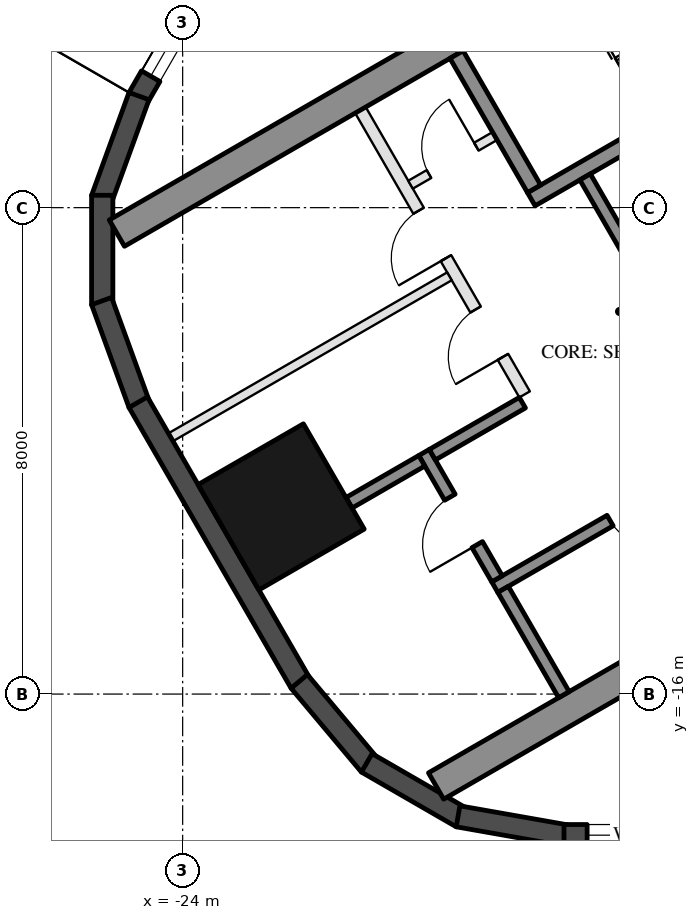
"""IFC4 building model, lengths in metres.
Left out: names, types, materials, properties, quantities, classifications, styles, units other than length and angle.
Written with IfcOpenShell. Run it as: python <this file> out.ifc"""

import sys

from ifc_helpers import new_model, si_unit, direction, frame, frame_2d, origin, origin_2d, place, context, subcontext, project, spatial, rectangle, hollow_rectangle, extrude, boolean, halfspace, element, fill, save


model = new_model("IFC4")
c1 = context("Model", 3, precision=1e-05, world=origin(), true_north=direction((0.0, 1.0)))
c2 = subcontext(c1, "Body", "Model", "MODEL_VIEW")
j1 = project(units=[si_unit("LENGTHUNIT", "METRE"), si_unit("PLANEANGLEUNIT", "RADIAN")], contexts=[c1])
p1 = place(None, origin())
s1 = spatial("IfcSite", under=j1, at=p1, CompositionType="ELEMENT")
p2 = place(p1, origin())
s2 = spatial("IfcBuilding", under=s1, at=p2, CompositionType="ELEMENT")
p3 = place(p2, frame((0.0, 0.0, 272.6)))
s3 = spatial("IfcBuildingStorey", under=s2, at=p3, CompositionType="ELEMENT", Elevation=272.6)
p4 = place(p3, frame((-22.38, -12.921, 0.0), z_axis=(0.0, 0.0, 1.0), x_axis=(-0.5, 0.866025403784, 0.0)))
e1 = element("IfcColumn", 1, at=p4, inside=s3, PredefinedType="COLUMN", context=c2, shape_type="SweptSolid", body=[
    boolean("DIFFERENCE", extrude(hollow_rectangle(XDim=2.0, YDim=2.0, WallThickness=0.05, at=origin_2d()), origin(), (0.0, 0.0, 1.0), 3.7), halfspace(frame((0.0, 0.0, 3.587), z_axis=(0.0, 0.0, 1.0), x_axis=(1.0, 0.0, 0.0)), False)),
])
p5 = place(p3, frame((-22.86, -2.953, 0.0), z_axis=(0.0, 0.0, 1.0), x_axis=(-0.50001992892, -0.866013897511, 0.0)))
e2 = element("IfcWall", 2, at=p5, inside=s3, PredefinedType="SOLIDWALL", context=c2, shape_type="SweptSolid", body=[
    extrude(rectangle(XDim=3.741, YDim=0.35, at=frame_2d((1.871, 0.0))), origin(), (0.0, 0.0, 1.0), 3.55),
])
p6 = place(p5, frame((2.531, 0.0, 0.3)))
e3 = element("IfcOpeningElement", 3, at=p6, cuts=e2, PredefinedType="OPENING", context=c2, shape_type="SweptSolid", body=[
    extrude(rectangle(XDim=0.8, YDim=2.65, at=frame_2d((0.4, 1.325))), frame((0.0, 0.185, 0.0), z_axis=(0.0, -1.0, 0.0), x_axis=(1.0, 0.0, 0.0)), (0.0, 0.0, 1.0), 0.37),
])
p7 = place(p3, frame((-24.718, -6.165, 0.0), z_axis=(0.0, 0.0, 1.0), x_axis=(-0.34206975284, -0.939674562916, 0.0)))
e4 = element("IfcWall", 4, at=p7, inside=s3, PredefinedType="SOLIDWALL", context=c2, shape_type="SweptSolid", body=[
    extrude(rectangle(XDim=1.8, YDim=0.35, at=frame_2d((0.9, 0.0))), origin(), (0.0, 0.0, 1.0), 3.55),
])
p8 = place(p3, frame((-25.323, -7.797, 0.0), z_axis=(0.0, 0.0, 1.0), x_axis=(0.0, -1.0, 0.0)))
e5 = element("IfcWall", 5, at=p8, inside=s3, PredefinedType="SOLIDWALL", context=c2, shape_type="SweptSolid", body=[
    extrude(rectangle(XDim=1.8, YDim=0.35, at=frame_2d((0.9, 0.0))), origin(), (0.0, 0.0, 1.0), 3.55),
])
p9 = place(p3, frame((-25.333, -9.537, 0.0), z_axis=(0.0, 0.0, 1.0), x_axis=(0.34206975284, -0.939674562916, 0.0)))
e6 = element("IfcWall", 6, at=p9, inside=s3, PredefinedType="SOLIDWALL", context=c2, shape_type="SweptSolid", body=[
    extrude(rectangle(XDim=1.8, YDim=0.35, at=frame_2d((0.9, 0.0))), origin(), (0.0, 0.0, 1.0), 3.55),
])
p10 = place(p3, frame((-24.731, -11.2, 0.0), z_axis=(0.0, 0.0, 1.0), x_axis=(0.500025039717, -0.866010946615, 0.0)))
e7 = element("IfcWall", 7, at=p10, inside=s3, PredefinedType="SOLIDWALL", context=c2, shape_type="SweptSolid", body=[
    extrude(rectangle(XDim=5.331, YDim=0.35, at=frame_2d((2.666, 0.0))), origin(), (0.0, 0.0, 1.0), 3.55),
])
p11 = place(p3, frame((-22.083, -15.792, 0.0), z_axis=(0.0, 0.0, 1.0), x_axis=(0.642756114672, -0.766070869471, 0.0)))
e8 = element("IfcWall", 8, at=p11, inside=s3, PredefinedType="SOLIDWALL", context=c2, shape_type="SweptSolid", body=[
    extrude(rectangle(XDim=1.8, YDim=0.35, at=frame_2d((0.9, 0.0))), origin(), (0.0, 0.0, 1.0), 3.55),
])
p12 = place(p3, frame((-20.972, -17.132, 0.0), z_axis=(0.0, 0.0, 1.0), x_axis=(0.866047807691, -0.499961193289, 0.0)))
e9 = element("IfcWall", 9, at=p12, inside=s3, PredefinedType="SOLIDWALL", context=c2, shape_type="SweptSolid", body=[
    extrude(rectangle(XDim=1.8, YDim=0.35, at=frame_2d((0.9, 0.0))), origin(), (0.0, 0.0, 1.0), 3.55),
])
p13 = place(p3, frame((-19.471, -18.011, 0.0), z_axis=(0.0, 0.0, 1.0), x_axis=(0.984810858511, -0.173630564586, 0.0)))
e10 = element("IfcWall", 10, at=p13, inside=s3, PredefinedType="SOLIDWALL", context=c2, shape_type="SweptSolid", body=[
    extrude(rectangle(XDim=1.8, YDim=0.35, at=frame_2d((0.9, 0.0))), origin(), (0.0, 0.0, 1.0), 3.55),
])
p14 = place(p3, frame((-17.729, -18.321, 0.0), z_axis=(0.0, 0.0, 1.0), x_axis=(1.0, 0.0, 0.0)))
e11 = element("IfcWall", 11, at=p14, inside=s3, PredefinedType="SOLIDWALL", context=c2, shape_type="SweptSolid", body=[
    extrude(rectangle(XDim=11.185, YDim=0.35, at=frame_2d((5.593, 0.0))), origin(), (0.0, 0.0, 1.0), 3.55),
])
p15 = place(p14, frame((0.381, 0.0, 0.3)))
e12 = element("IfcOpeningElement", 12, at=p15, cuts=e11, PredefinedType="OPENING", context=c2, shape_type="SweptSolid", body=[
    extrude(rectangle(XDim=1.7, YDim=2.65, at=frame_2d((0.85, 1.325))), frame((0.0, 0.185, 0.0), z_axis=(0.0, -1.0, 0.0), x_axis=(1.0, 0.0, 0.0)), (0.0, 0.0, 1.0), 0.37),
])
p16 = place(p14, frame((7.21, 0.0, 0.0)))
e13 = element("IfcOpeningElement", 13, at=p16, cuts=e11, PredefinedType="OPENING", context=c2, shape_type="SweptSolid", body=[
    extrude(rectangle(XDim=2.4, YDim=2.4, at=frame_2d((1.2, 1.2))), frame((0.0, 0.185, 0.0), z_axis=(0.0, -1.0, 0.0), x_axis=(1.0, 0.0, 0.0)), (0.0, 0.0, 1.0), 0.37),
])
p17 = place(p14, frame((3.516, 0.0, 0.3)))
e14 = element("IfcOpeningElement", 14, at=p17, cuts=e11, PredefinedType="OPENING", context=c2, shape_type="SweptSolid", body=[
    extrude(rectangle(XDim=1.5, YDim=2.65, at=frame_2d((0.75, 1.325))), frame((0.0, 0.185, 0.0), z_axis=(0.0, -1.0, 0.0), x_axis=(1.0, 0.0, 0.0)), (0.0, 0.0, 1.0), 0.37),
])
p18 = place(p14, frame((5.316, 0.0, 0.3)))
e15 = element("IfcOpeningElement", 15, at=p18, cuts=e11, PredefinedType="OPENING", context=c2, shape_type="SweptSolid", body=[
    extrude(rectangle(XDim=1.5, YDim=2.65, at=frame_2d((0.75, 1.325))), frame((0.0, 0.185, 0.0), z_axis=(0.0, -1.0, 0.0), x_axis=(1.0, 0.0, 0.0)), (0.0, 0.0, 1.0), 0.37),
])
for number, where, z_axis, x_axis in (
    (16, (-13.797, -1.903, 0.0), (0.0, 0.0, 1.0), (-0.866, -0.5, 0.0)),
    (17, (-8.547, -10.997, 0.0), (0.0, 0.0, 1.0), (-0.866, -0.5, 0.0)),
):
    element("IfcWall", number, at=place(p3, frame(where, z_axis=z_axis, x_axis=x_axis)), inside=s3, PredefinedType="SHEAR", context=c2, shape_type="SweptSolid", body=[
        extrude(rectangle(XDim=13.031, YDim=0.5, at=frame_2d((6.516, 0.0))), origin(), (0.0, 0.0, 1.0), 3.5),
    ])
p19 = place(p3, frame((-12.681, -4.636, 0.0), z_axis=(0.0, 0.0, 1.0), x_axis=(-0.866021702275, -0.500006411147, 0.0)))
e18 = element("IfcWall", 18, at=p19, inside=s3, PredefinedType="SHEAR", context=c2, shape_type="SweptSolid", body=[
    extrude(rectangle(XDim=6.45, YDim=0.25, at=frame_2d((3.225, 0.0))), origin(), (0.0, 0.0, 1.0), 3.5),
])
p20 = place(p19, frame((0.3, 0.0, 0.0)))
e19 = element("IfcOpeningElement", 19, at=p20, cuts=e18, PredefinedType="OPENING", context=c2, shape_type="SweptSolid", body=[
    extrude(rectangle(XDim=1.0, YDim=2.1, at=frame_2d((0.5, 1.05))), frame((0.0, 0.135, 0.0), z_axis=(0.0, -1.0, 0.0), x_axis=(1.0, 0.0, 0.0)), (0.0, 0.0, 1.0), 0.27),
])
p21 = place(p3, frame((-19.496, -5.482, 0.0), z_axis=(0.0, 0.0, 1.0), x_axis=(0.499990435942, -0.866030925526, 0.0)))
e20 = element("IfcWall", 20, at=p21, inside=s3, PredefinedType="SHEAR", context=c2, shape_type="SweptSolid", body=[
    extrude(rectangle(XDim=2.55, YDim=0.25, at=frame_2d((1.275, 0.0))), origin(), (0.0, 0.0, 1.0), 3.5),
])
p22 = place(p3, frame((-17.381, -7.495, 0.0), z_axis=(0.0, 0.0, 1.0), x_axis=(0.500011755427, -0.866018616679, 0.0)))
e21 = element("IfcWall", 21, at=p22, inside=s3, PredefinedType="SHEAR", context=c2, shape_type="SweptSolid", body=[
    extrude(rectangle(XDim=2.8, YDim=0.2, at=frame_2d((1.4, 0.0))), origin(), (0.0, 0.0, 1.0), 3.5),
])
p23 = place(p3, frame((-10.068, -9.162, 0.0), z_axis=(0.0, 0.0, 1.0), x_axis=(-0.866032725843, -0.499987317609, 0.0)))
e22 = element("IfcWall", 22, at=p23, inside=s3, PredefinedType="SHEAR", context=c2, shape_type="SweptSolid", body=[
    extrude(rectangle(XDim=10.16, YDim=0.2, at=frame_2d((5.08, 0.0))), origin(), (0.0, 0.0, 1.0), 3.5),
])
p24 = place(p23, frame((1.99, 0.0, 0.0)))
e23 = element("IfcOpeningElement", 23, at=p24, cuts=e22, PredefinedType="OPENING", context=c2, shape_type="SweptSolid", body=[
    extrude(rectangle(XDim=0.9, YDim=2.1, at=frame_2d((0.45, 1.05))), frame((0.0, 0.11, 0.0), z_axis=(0.0, -1.0, 0.0), x_axis=(1.0, 0.0, 0.0)), (0.0, 0.0, 1.0), 0.22),
])
p25 = place(p23, frame((7.07, 0.0, 0.0)))
e24 = element("IfcOpeningElement", 24, at=p25, cuts=e22, PredefinedType="OPENING", context=c2, shape_type="SweptSolid", body=[
    extrude(rectangle(XDim=0.9, YDim=2.1, at=frame_2d((0.45, 1.05))), frame((0.0, 0.11, 0.0), z_axis=(0.0, -1.0, 0.0), x_axis=(1.0, 0.0, 0.0)), (0.0, 0.0, 1.0), 0.22),
])
p26 = place(p3, frame((-20.031, -12.026, 0.0), z_axis=(0.0, 0.0, 1.0), x_axis=(0.500033551112, -0.866006032174, 0.0)))
e25 = element("IfcWall", 25, at=p26, inside=s3, PredefinedType="SHEAR", context=c2, shape_type="SweptSolid", body=[
    extrude(rectangle(XDim=2.4, YDim=0.2, at=frame_2d((1.2, 0.0))), origin(), (0.0, 0.0, 1.0), 3.5),
])
p27 = place(p26, frame((0.85, 0.0, 0.0)))
e26 = element("IfcOpeningElement", 26, at=p27, cuts=e25, PredefinedType="OPENING", context=c2, shape_type="SweptSolid", body=[
    extrude(rectangle(XDim=0.9, YDim=2.1, at=frame_2d((0.45, 1.05))), frame((0.0, 0.11, 0.0), z_axis=(0.0, -1.0, 0.0), x_axis=(1.0, 0.0, 0.0)), (0.0, 0.0, 1.0), 0.22),
])
p28 = place(p3, frame((-18.413, -11.208, 0.0), z_axis=(0.0, 0.0, 1.0), x_axis=(-0.866038183914, -0.499977863513, 0.0)))
e27 = element("IfcWall", 27, at=p28, inside=s3, PredefinedType="SHEAR", context=c2, shape_type="SweptSolid", body=[
    extrude(rectangle(XDim=1.71, YDim=0.2, at=frame_2d((0.855, 0.0))), origin(), (0.0, 0.0, 1.0), 3.5),
])
p29 = place(p3, frame((-18.73, -14.278, 0.0), z_axis=(0.0, 0.0, 1.0), x_axis=(0.50002537861, -0.866010750942, 0.0)))
e28 = element("IfcWall", 28, at=p29, inside=s3, PredefinedType="SHEAR", context=c2, shape_type="SweptSolid", body=[
    extrude(rectangle(XDim=2.0, YDim=0.2, at=frame_2d((1.0, 0.0))), origin(), (0.0, 0.0, 1.0), 3.5),
])
p30 = place(p3, frame((-20.067, -12.163, 0.0), z_axis=(0.0, 0.0, 1.0), x_axis=(-0.866094443108, -0.499880401313, 0.0)))
e29 = element("IfcWall", 29, at=p30, inside=s3, PredefinedType="SHEAR", context=c2, shape_type="SweptSolid", body=[
    extrude(rectangle(XDim=1.383, YDim=0.2, at=frame_2d((0.691, 0.0))), origin(), (0.0, 0.0, 1.0), 3.5),
])
p31 = place(p3, frame((-21.076, -6.395, 0.0), z_axis=(0.0, 0.0, 1.0), x_axis=(0.50001468107, -0.866016927499, 0.0)))
e30 = element("IfcWall", 30, at=p31, inside=s3, PredefinedType="PARTITIONING", context=c2, shape_type="SweptSolid", body=[
    extrude(rectangle(XDim=5.4, YDim=0.2, at=frame_2d((2.7, 0.0))), origin(), (0.0, 0.0, 1.0), 3.5),
])
p32 = place(p31, frame((1.913, 0.0, 0.0)))
e31 = element("IfcOpeningElement", 31, at=p32, cuts=e30, PredefinedType="OPENING", context=c2, shape_type="SweptSolid", body=[
    extrude(rectangle(XDim=0.9, YDim=2.1, at=frame_2d((0.45, 1.05))), frame((0.0, 0.11, 0.0), z_axis=(0.0, -1.0, 0.0), x_axis=(1.0, 0.0, 0.0)), (0.0, 0.0, 1.0), 0.22),
])
p33 = place(p31, frame((3.788, 0.0, 0.0)))
e32 = element("IfcOpeningElement", 32, at=p33, cuts=e30, PredefinedType="OPENING", context=c2, shape_type="SweptSolid", body=[
    extrude(rectangle(XDim=0.9, YDim=2.1, at=frame_2d((0.45, 1.05))), frame((0.0, 0.11, 0.0), z_axis=(0.0, -1.0, 0.0), x_axis=(1.0, 0.0, 0.0)), (0.0, 0.0, 1.0), 0.22),
])
p34 = place(p3, frame((-18.866, -6.822, 0.0), z_axis=(0.0, 0.0, 1.0), x_axis=(-0.866028054938, -0.499995408039, 0.0)))
e33 = element("IfcWall", 33, at=p34, inside=s3, PredefinedType="PARTITIONING", context=c2, shape_type="SweptSolid", body=[
    extrude(rectangle(XDim=1.6, YDim=0.15, at=frame_2d((0.8, 0.0))), origin(), (0.0, 0.0, 1.0), 3.5),
])
p35 = place(p34, frame((0.35, 0.0, 0.0)))
e34 = element("IfcOpeningElement", 34, at=p35, cuts=e33, PredefinedType="OPENING", context=c2, shape_type="SweptSolid", body=[
    extrude(rectangle(XDim=0.9, YDim=2.1, at=frame_2d((0.45, 1.05))), frame((0.0, 0.085, 0.0), z_axis=(0.0, -1.0, 0.0), x_axis=(1.0, 0.0, 0.0)), (0.0, 0.0, 1.0), 0.17),
])
p36 = place(p3, frame((-19.613, -9.13, 0.0), z_axis=(0.0, 0.0, 1.0), x_axis=(-0.866028878405, -0.499993981732, 0.0)))
e35 = element("IfcWall", 35, at=p36, inside=s3, PredefinedType="PARTITIONING", context=c2, shape_type="SweptSolid", body=[
    extrude(rectangle(XDim=5.292, YDim=0.15, at=frame_2d((2.646, 0.0))), origin(), (0.0, 0.0, 1.0), 3.5),
])
p37 = place(p15, origin())
e36 = element("IfcWindow", 36, at=p37, inside=s3, PartitioningType="SINGLE_PANEL", PredefinedType="WINDOW", context=c2, shape_type="SweptSolid", body=[
    extrude(rectangle(XDim=1.7, YDim=2.65, at=frame_2d((0.85, 1.325))), frame((0.0, 0.03, 0.0), z_axis=(0.0, -1.0, 0.0), x_axis=(1.0, 0.0, 0.0)), (0.0, 0.0, 1.0), 0.06),
])
fill(e12, e36)
p38 = place(p6, origin())
e37 = element("IfcWindow", 37, at=p38, inside=s3, PartitioningType="SINGLE_PANEL", PredefinedType="WINDOW", context=c2, shape_type="SweptSolid", body=[
    extrude(rectangle(XDim=0.8, YDim=2.65, at=frame_2d((0.4, 1.325))), frame((0.0, 0.03, 0.0), z_axis=(0.0, -1.0, 0.0), x_axis=(1.0, 0.0, 0.0)), (0.0, 0.0, 1.0), 0.06),
])
fill(e3, e37)
p39 = place(p35, frame((0.9, 0.0, 0.0), z_axis=(0.0, 0.0, 1.0), x_axis=(-1.0, 0.0, 0.0)))
e38 = element("IfcDoor", 38, at=p39, inside=s3, OperationType="SINGLE_SWING_RIGHT", PredefinedType="DOOR", context=c2, shape_type="SweptSolid", body=[
    extrude(rectangle(XDim=0.9, YDim=2.1, at=frame_2d((0.45, 1.05))), frame((0.0, 0.025, 0.0), z_axis=(0.0, -1.0, 0.0), x_axis=(1.0, 0.0, 0.0)), (0.0, 0.0, 1.0), 0.05),
])
fill(e34, e38)
p40 = place(p25, origin())
e39 = element("IfcDoor", 39, at=p40, inside=s3, OperationType="SINGLE_SWING_LEFT", PredefinedType="DOOR", context=c2, shape_type="SweptSolid", body=[
    extrude(rectangle(XDim=0.9, YDim=2.1, at=frame_2d((0.45, 1.05))), frame((0.0, 0.025, 0.0), z_axis=(0.0, -1.0, 0.0), x_axis=(1.0, 0.0, 0.0)), (0.0, 0.0, 1.0), 0.05),
])
fill(e24, e39)
p41 = place(p27, frame((0.9, 0.0, 0.0), z_axis=(0.0, 0.0, 1.0), x_axis=(-1.0, 0.0, 0.0)))
e40 = element("IfcDoor", 40, at=p41, inside=s3, OperationType="SINGLE_SWING_LEFT", PredefinedType="DOOR", context=c2, shape_type="SweptSolid", body=[
    extrude(rectangle(XDim=0.9, YDim=2.1, at=frame_2d((0.45, 1.05))), frame((0.0, 0.025, 0.0), z_axis=(0.0, -1.0, 0.0), x_axis=(1.0, 0.0, 0.0)), (0.0, 0.0, 1.0), 0.05),
])
fill(e26, e40)
p42 = place(p32, frame((0.9, 0.0, 0.0), z_axis=(0.0, 0.0, 1.0), x_axis=(-1.0, 0.0, 0.0)))
e41 = element("IfcDoor", 41, at=p42, inside=s3, OperationType="SINGLE_SWING_LEFT", PredefinedType="DOOR", context=c2, shape_type="SweptSolid", body=[
    extrude(rectangle(XDim=0.9, YDim=2.1, at=frame_2d((0.45, 1.05))), frame((0.0, 0.025, 0.0), z_axis=(0.0, -1.0, 0.0), x_axis=(1.0, 0.0, 0.0)), (0.0, 0.0, 1.0), 0.05),
])
fill(e31, e41)
p43 = place(p33, frame((0.9, 0.0, 0.0), z_axis=(0.0, 0.0, 1.0), x_axis=(-1.0, 0.0, 0.0)))
e42 = element("IfcDoor", 42, at=p43, inside=s3, OperationType="SINGLE_SWING_LEFT", PredefinedType="DOOR", context=c2, shape_type="SweptSolid", body=[
    extrude(rectangle(XDim=0.9, YDim=2.1, at=frame_2d((0.45, 1.05))), frame((0.0, 0.025, 0.0), z_axis=(0.0, -1.0, 0.0), x_axis=(1.0, 0.0, 0.0)), (0.0, 0.0, 1.0), 0.05),
])
fill(e32, e42)
save(model, sys.argv[1])
